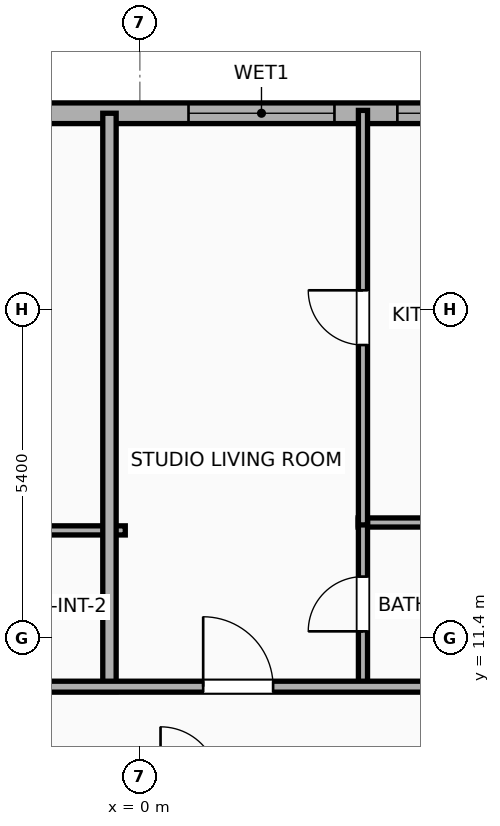
"""IFC4 building model, lengths in metres.
Left out: names, types, materials, properties, quantities, classifications, styles, units other than length and angle.
Written with IfcOpenShell. Run it as: python <this file> out.ifc"""

import sys

from ifc_helpers import new_model, si_unit, direction, frame, frame_2d, origin, place, context, subcontext, project, spatial, rectangle, extrude, element, fill, save


model = new_model("IFC4")
c1 = context("Model", 3, precision=1e-05, world=origin(), true_north=direction((0.0, 1.0)))
c2 = subcontext(c1, "Body", "Model", "MODEL_VIEW")
j1 = project(units=[si_unit("LENGTHUNIT", "METRE"), si_unit("PLANEANGLEUNIT", "RADIAN")], contexts=[c1])
p1 = place(None, origin())
s1 = spatial("IfcSite", under=j1, at=p1, CompositionType="ELEMENT")
p2 = place(p1, origin())
s2 = spatial("IfcBuilding", under=s1, at=p2, CompositionType="ELEMENT")
p3 = place(p2, frame((0.0, 0.0, 247.0)))
s3 = spatial("IfcBuildingStorey", under=s2, at=p3, CompositionType="ELEMENT", Elevation=247.0)
p4 = place(p3, frame((-22.783, 20.03, 0.0), z_axis=(0.0, 0.0, 1.0), x_axis=(1.0, 0.0, 0.0)))
e1 = element("IfcWall", 1, at=p4, inside=s3, PredefinedType="ELEMENTEDWALL", context=c2, shape_type="SweptSolid", body=[
    extrude(rectangle(XDim=49.566, YDim=0.34, at=frame_2d((24.783, 0.0))), origin(), (0.0, 0.0, 1.0), 3.65),
])
p5 = place(p4, frame((6.211, 0.0, 0.75)))
e2 = element("IfcOpeningElement", 2, at=p5, cuts=e1, PredefinedType="OPENING", context=c2, shape_type="SweptSolid", body=[
    extrude(rectangle(XDim=2.4, YDim=2.1, at=frame_2d((1.2, 1.05))), frame((0.0, 0.18, 0.0), z_axis=(0.0, -1.0, 0.0), x_axis=(1.0, 0.0, 0.0)), (0.0, 0.0, 1.0), 0.36),
])
p6 = place(p4, frame((23.583, 0.0, 0.75)))
e3 = element("IfcOpeningElement", 3, at=p6, cuts=e1, PredefinedType="OPENING", context=c2, shape_type="SweptSolid", body=[
    extrude(rectangle(XDim=2.4, YDim=2.1, at=frame_2d((1.2, 1.05))), frame((0.0, 0.18, 0.0), z_axis=(0.0, -1.0, 0.0), x_axis=(1.0, 0.0, 0.0)), (0.0, 0.0, 1.0), 0.36),
])
p7 = place(p4, frame((41.756, 0.0, 0.75)))
e4 = element("IfcOpeningElement", 4, at=p7, cuts=e1, PredefinedType="OPENING", context=c2, shape_type="SweptSolid", body=[
    extrude(rectangle(XDim=2.4, YDim=2.1, at=frame_2d((1.2, 1.05))), frame((0.0, 0.18, 0.0), z_axis=(0.0, -1.0, 0.0), x_axis=(1.0, 0.0, 0.0)), (0.0, 0.0, 1.0), 0.36),
])
p8 = place(p4, frame((3.511, 0.0, 0.75)))
e5 = element("IfcOpeningElement", 5, at=p8, cuts=e1, PredefinedType="OPENING", context=c2, shape_type="SweptSolid", body=[
    extrude(rectangle(XDim=1.2, YDim=2.05, at=frame_2d((0.6, 1.025))), frame((0.0, 0.18, 0.0), z_axis=(0.0, -1.0, 0.0), x_axis=(1.0, 0.0, 0.0)), (0.0, 0.0, 1.0), 0.36),
])
p9 = place(p4, frame((11.933, 0.0, 0.75)))
e6 = element("IfcOpeningElement", 6, at=p9, cuts=e1, PredefinedType="OPENING", context=c2, shape_type="SweptSolid", body=[
    extrude(rectangle(XDim=1.2, YDim=2.05, at=frame_2d((0.6, 1.025))), frame((0.0, 0.18, 0.0), z_axis=(0.0, -1.0, 0.0), x_axis=(1.0, 0.0, 0.0)), (0.0, 0.0, 1.0), 0.36),
])
p10 = place(p4, frame((17.953, 0.0, 0.75)))
e7 = element("IfcOpeningElement", 7, at=p10, cuts=e1, PredefinedType="OPENING", context=c2, shape_type="SweptSolid", body=[
    extrude(rectangle(XDim=1.2, YDim=2.05, at=frame_2d((0.6, 1.025))), frame((0.0, 0.18, 0.0), z_axis=(0.0, -1.0, 0.0), x_axis=(1.0, 0.0, 0.0)), (0.0, 0.0, 1.0), 0.36),
])
p11 = place(p4, frame((27.018, 0.0, 0.75)))
e8 = element("IfcOpeningElement", 8, at=p11, cuts=e1, PredefinedType="OPENING", context=c2, shape_type="SweptSolid", body=[
    extrude(rectangle(XDim=1.2, YDim=2.05, at=frame_2d((0.6, 1.025))), frame((0.0, 0.18, 0.0), z_axis=(0.0, -1.0, 0.0), x_axis=(1.0, 0.0, 0.0)), (0.0, 0.0, 1.0), 0.36),
])
p12 = place(p4, frame((30.368, 0.0, 0.75)))
e9 = element("IfcOpeningElement", 9, at=p12, cuts=e1, PredefinedType="OPENING", context=c2, shape_type="SweptSolid", body=[
    extrude(rectangle(XDim=1.2, YDim=2.05, at=frame_2d((0.6, 1.025))), frame((0.0, 0.18, 0.0), z_axis=(0.0, -1.0, 0.0), x_axis=(1.0, 0.0, 0.0)), (0.0, 0.0, 1.0), 0.36),
])
p13 = place(p4, frame((33.378, 0.0, 0.75)))
e10 = element("IfcOpeningElement", 10, at=p13, cuts=e1, PredefinedType="OPENING", context=c2, shape_type="SweptSolid", body=[
    extrude(rectangle(XDim=1.2, YDim=2.05, at=frame_2d((0.6, 1.025))), frame((0.0, 0.18, 0.0), z_axis=(0.0, -1.0, 0.0), x_axis=(1.0, 0.0, 0.0)), (0.0, 0.0, 1.0), 0.36),
])
p14 = place(p4, frame((37.639, 0.0, 0.75)))
e11 = element("IfcOpeningElement", 11, at=p14, cuts=e1, PredefinedType="OPENING", context=c2, shape_type="SweptSolid", body=[
    extrude(rectangle(XDim=1.2, YDim=2.05, at=frame_2d((0.6, 1.025))), frame((0.0, 0.18, 0.0), z_axis=(0.0, -1.0, 0.0), x_axis=(1.0, 0.0, 0.0)), (0.0, 0.0, 1.0), 0.36),
])
p15 = place(p4, frame((45.25, 0.0, 0.75)))
e12 = element("IfcOpeningElement", 12, at=p15, cuts=e1, PredefinedType="OPENING", context=c2, shape_type="SweptSolid", body=[
    extrude(rectangle(XDim=1.2, YDim=2.05, at=frame_2d((0.6, 1.025))), frame((0.0, 0.18, 0.0), z_axis=(0.0, -1.0, 0.0), x_axis=(1.0, 0.0, 0.0)), (0.0, 0.0, 1.0), 0.36),
])
p16 = place(p4, frame((47.292, 0.0, 0.75)))
e13 = element("IfcOpeningElement", 13, at=p16, cuts=e1, PredefinedType="OPENING", context=c2, shape_type="SweptSolid", body=[
    extrude(rectangle(XDim=1.2, YDim=2.05, at=frame_2d((0.6, 1.025))), frame((0.0, 0.18, 0.0), z_axis=(0.0, -1.0, 0.0), x_axis=(1.0, 0.0, 0.0)), (0.0, 0.0, 1.0), 0.36),
])
p17 = place(p3, frame((-2.789, 13.17, 0.0), z_axis=(0.0, 0.0, 1.0), x_axis=(1.0, 0.0, 0.0)))
e14 = element("IfcWall", 14, at=p17, inside=s3, PredefinedType="PLUMBINGWALL", context=c2, shape_type="SweptSolid", body=[
    extrude(rectangle(XDim=2.549, YDim=0.15, at=frame_2d((1.274, 0.0))), origin(), (0.0, 0.0, 1.0), 3.65),
])
p18 = place(p3, frame((-0.5, 10.52, 0.0), z_axis=(0.0, 0.0, 1.0), x_axis=(0.0, 1.0, 0.0)))
e15 = element("IfcWall", 15, at=p18, inside=s3, PredefinedType="PARTITIONING", context=c2, shape_type="SweptSolid", body=[
    extrude(rectangle(XDim=9.51, YDim=0.22, at=frame_2d((4.755, 0.0))), origin(), (0.0, 0.0, 1.0), 3.65),
])
p19 = place(p3, frame((3.589, 13.3, 0.0), z_axis=(0.0, 0.0, 1.0), x_axis=(1.0, 0.0, 0.0)))
e16 = element("IfcWall", 16, at=p19, inside=s3, PredefinedType="PLUMBINGWALL", context=c2, shape_type="SweptSolid", body=[
    extrude(rectangle(XDim=2.671, YDim=0.15, at=frame_2d((1.335, 0.0))), origin(), (0.0, 0.0, 1.0), 3.65),
])
p20 = place(p3, frame((3.669, 10.58, 0.0), z_axis=(0.0, 0.0, 1.0), x_axis=(0.0, 1.0, 0.0)))
e17 = element("IfcWall", 17, at=p20, inside=s3, PredefinedType="PLUMBINGWALL", context=c2, shape_type="SweptSolid", body=[
    extrude(rectangle(XDim=2.76, YDim=0.15, at=frame_2d((1.38, 0.0))), origin(), (0.0, 0.0, 1.0), 3.65),
])
p21 = place(p20, frame((0.93, 0.0, 0.0)))
e18 = element("IfcOpeningElement", 18, at=p21, cuts=e17, PredefinedType="OPENING", context=c2, shape_type="SweptSolid", body=[
    extrude(rectangle(XDim=0.9, YDim=2.05, at=frame_2d((0.45, 1.025))), frame((0.0, 0.085, 0.0), z_axis=(0.0, -1.0, 0.0), x_axis=(1.0, 0.0, 0.0)), (0.0, 0.0, 1.0), 0.17),
])
p22 = place(p3, frame((3.669, 13.26, 0.0), z_axis=(0.0, 0.0, 1.0), x_axis=(0.0, 1.0, 0.0)))
e19 = element("IfcWall", 19, at=p22, inside=s3, PredefinedType="PLUMBINGWALL", context=c2, shape_type="SweptSolid", body=[
    extrude(rectangle(XDim=6.817, YDim=0.15, at=frame_2d((3.408, 0.0))), origin(), (0.0, 0.0, 1.0), 3.65),
])
p23 = place(p22, frame((2.958, 0.0, 0.0)))
e20 = element("IfcOpeningElement", 20, at=p23, cuts=e19, PredefinedType="OPENING", context=c2, shape_type="SweptSolid", body=[
    extrude(rectangle(XDim=0.9, YDim=2.05, at=frame_2d((0.45, 1.025))), frame((0.0, 0.085, 0.0), z_axis=(0.0, -1.0, 0.0), x_axis=(1.0, 0.0, 0.0)), (0.0, 0.0, 1.0), 0.17),
])
p24 = place(p3, frame((-26.23, 10.6, 0.0), z_axis=(0.0, 0.0, 1.0), x_axis=(1.0, 0.0, 0.0)))
e21 = element("IfcWall", 21, at=p24, inside=s3, PredefinedType="PARTITIONING", context=c2, shape_type="SweptSolid", body=[
    extrude(rectangle(XDim=56.46, YDim=0.18, at=frame_2d((28.23, 0.0))), origin(), (0.0, 0.0, 1.0), 3.65),
])
p25 = place(p24, frame((2.825, 0.0, 0.0)))
e22 = element("IfcOpeningElement", 22, at=p25, cuts=e21, PredefinedType="OPENING", context=c2, shape_type="SweptSolid", body=[
    extrude(rectangle(XDim=0.9, YDim=2.05, at=frame_2d((0.45, 1.025))), frame((0.0, 0.1, 0.0), z_axis=(0.0, -1.0, 0.0), x_axis=(1.0, 0.0, 0.0)), (0.0, 0.0, 1.0), 0.2),
])
p26 = place(p24, frame((10.135, 0.0, 0.0)))
e23 = element("IfcOpeningElement", 23, at=p26, cuts=e21, PredefinedType="OPENING", context=c2, shape_type="SweptSolid", body=[
    extrude(rectangle(XDim=1.15, YDim=2.05, at=frame_2d((0.575, 1.025))), frame((0.0, 0.1, 0.0), z_axis=(0.0, -1.0, 0.0), x_axis=(1.0, 0.0, 0.0)), (0.0, 0.0, 1.0), 0.2),
])
p27 = place(p24, frame((15.658, 0.0, 0.0)))
e24 = element("IfcOpeningElement", 24, at=p27, cuts=e21, PredefinedType="OPENING", context=c2, shape_type="SweptSolid", body=[
    extrude(rectangle(XDim=0.9, YDim=2.05, at=frame_2d((0.45, 1.025))), frame((0.0, 0.1, 0.0), z_axis=(0.0, -1.0, 0.0), x_axis=(1.0, 0.0, 0.0)), (0.0, 0.0, 1.0), 0.2),
])
p28 = place(p24, frame((22.156, 0.0, 0.0)))
e25 = element("IfcOpeningElement", 25, at=p28, cuts=e21, PredefinedType="OPENING", context=c2, shape_type="SweptSolid", body=[
    extrude(rectangle(XDim=0.9, YDim=2.05, at=frame_2d((0.45, 1.025))), frame((0.0, 0.1, 0.0), z_axis=(0.0, -1.0, 0.0), x_axis=(1.0, 0.0, 0.0)), (0.0, 0.0, 1.0), 0.2),
])
p29 = place(p24, frame((27.271, 0.0, 0.0)))
e26 = element("IfcOpeningElement", 26, at=p29, cuts=e21, PredefinedType="OPENING", context=c2, shape_type="SweptSolid", body=[
    extrude(rectangle(XDim=1.15, YDim=2.05, at=frame_2d((0.575, 1.025))), frame((0.0, 0.1, 0.0), z_axis=(0.0, -1.0, 0.0), x_axis=(1.0, 0.0, 0.0)), (0.0, 0.0, 1.0), 0.2),
])
p30 = place(p24, frame((33.628, 0.0, 0.0)))
e27 = element("IfcOpeningElement", 27, at=p30, cuts=e21, PredefinedType="OPENING", context=c2, shape_type="SweptSolid", body=[
    extrude(rectangle(XDim=1.15, YDim=2.05, at=frame_2d((0.575, 1.025))), frame((0.0, 0.1, 0.0), z_axis=(0.0, -1.0, 0.0), x_axis=(1.0, 0.0, 0.0)), (0.0, 0.0, 1.0), 0.2),
])
p31 = place(p24, frame((41.375, 0.0, 0.0)))
e28 = element("IfcOpeningElement", 28, at=p31, cuts=e21, PredefinedType="OPENING", context=c2, shape_type="SweptSolid", body=[
    extrude(rectangle(XDim=0.9, YDim=2.05, at=frame_2d((0.45, 1.025))), frame((0.0, 0.1, 0.0), z_axis=(0.0, -1.0, 0.0), x_axis=(1.0, 0.0, 0.0)), (0.0, 0.0, 1.0), 0.2),
])
p32 = place(p24, frame((45.796, 0.0, 0.0)))
e29 = element("IfcOpeningElement", 29, at=p32, cuts=e21, PredefinedType="OPENING", context=c2, shape_type="SweptSolid", body=[
    extrude(rectangle(XDim=1.15, YDim=2.05, at=frame_2d((0.575, 1.025))), frame((0.0, 0.1, 0.0), z_axis=(0.0, -1.0, 0.0), x_axis=(1.0, 0.0, 0.0)), (0.0, 0.0, 1.0), 0.2),
])
p33 = place(p24, frame((53.221, 0.0, 0.0)))
e30 = element("IfcOpeningElement", 30, at=p33, cuts=e21, PredefinedType="OPENING", context=c2, shape_type="SweptSolid", body=[
    extrude(rectangle(XDim=0.9, YDim=2.05, at=frame_2d((0.45, 1.025))), frame((0.0, 0.1, 0.0), z_axis=(0.0, -1.0, 0.0), x_axis=(1.0, 0.0, 0.0)), (0.0, 0.0, 1.0), 0.2),
])
p34 = place(p6, origin())
e31 = element("IfcWindow", 31, at=p34, inside=s3, PartitioningType="SINGLE_PANEL", PredefinedType="WINDOW", context=c2, shape_type="SweptSolid", body=[
    extrude(rectangle(XDim=2.4, YDim=2.1, at=frame_2d((1.2, 1.05))), frame((0.0, 0.03, 0.0), z_axis=(0.0, -1.0, 0.0), x_axis=(1.0, 0.0, 0.0)), (0.0, 0.0, 1.0), 0.06),
])
fill(e3, e31)
p35 = place(p11, origin())
e32 = element("IfcWindow", 32, at=p35, inside=s3, PartitioningType="SINGLE_PANEL", PredefinedType="WINDOW", context=c2, shape_type="SweptSolid", body=[
    extrude(rectangle(XDim=1.2, YDim=2.05, at=frame_2d((0.6, 1.025))), frame((0.0, 0.03, 0.0), z_axis=(0.0, -1.0, 0.0), x_axis=(1.0, 0.0, 0.0)), (0.0, 0.0, 1.0), 0.06),
])
fill(e8, e32)
p36 = place(p21, origin())
e33 = element("IfcDoor", 33, at=p36, inside=s3, OperationType="SINGLE_SWING_LEFT", PredefinedType="DOOR", context=c2, shape_type="SweptSolid", body=[
    extrude(rectangle(XDim=0.9, YDim=2.05, at=frame_2d((0.45, 1.025))), frame((0.0, 0.025, 0.0), z_axis=(0.0, -1.0, 0.0), x_axis=(1.0, 0.0, 0.0)), (0.0, 0.0, 1.0), 0.05),
])
fill(e18, e33)
p37 = place(p23, origin())
e34 = element("IfcDoor", 34, at=p37, inside=s3, OperationType="SINGLE_SWING_RIGHT", PredefinedType="DOOR", context=c2, shape_type="SweptSolid", body=[
    extrude(rectangle(XDim=0.9, YDim=2.05, at=frame_2d((0.45, 1.025))), frame((0.0, 0.025, 0.0), z_axis=(0.0, -1.0, 0.0), x_axis=(1.0, 0.0, 0.0)), (0.0, 0.0, 1.0), 0.05),
])
fill(e20, e34)
p38 = place(p29, origin())
e35 = element("IfcDoor", 35, at=p38, inside=s3, OperationType="SINGLE_SWING_LEFT", PredefinedType="DOOR", context=c2, shape_type="SweptSolid", body=[
    extrude(rectangle(XDim=1.15, YDim=2.05, at=frame_2d((0.575, 1.025))), frame((0.0, 0.025, 0.0), z_axis=(0.0, -1.0, 0.0), x_axis=(1.0, 0.0, 0.0)), (0.0, 0.0, 1.0), 0.05),
])
fill(e26, e35)
save(model, sys.argv[1])
